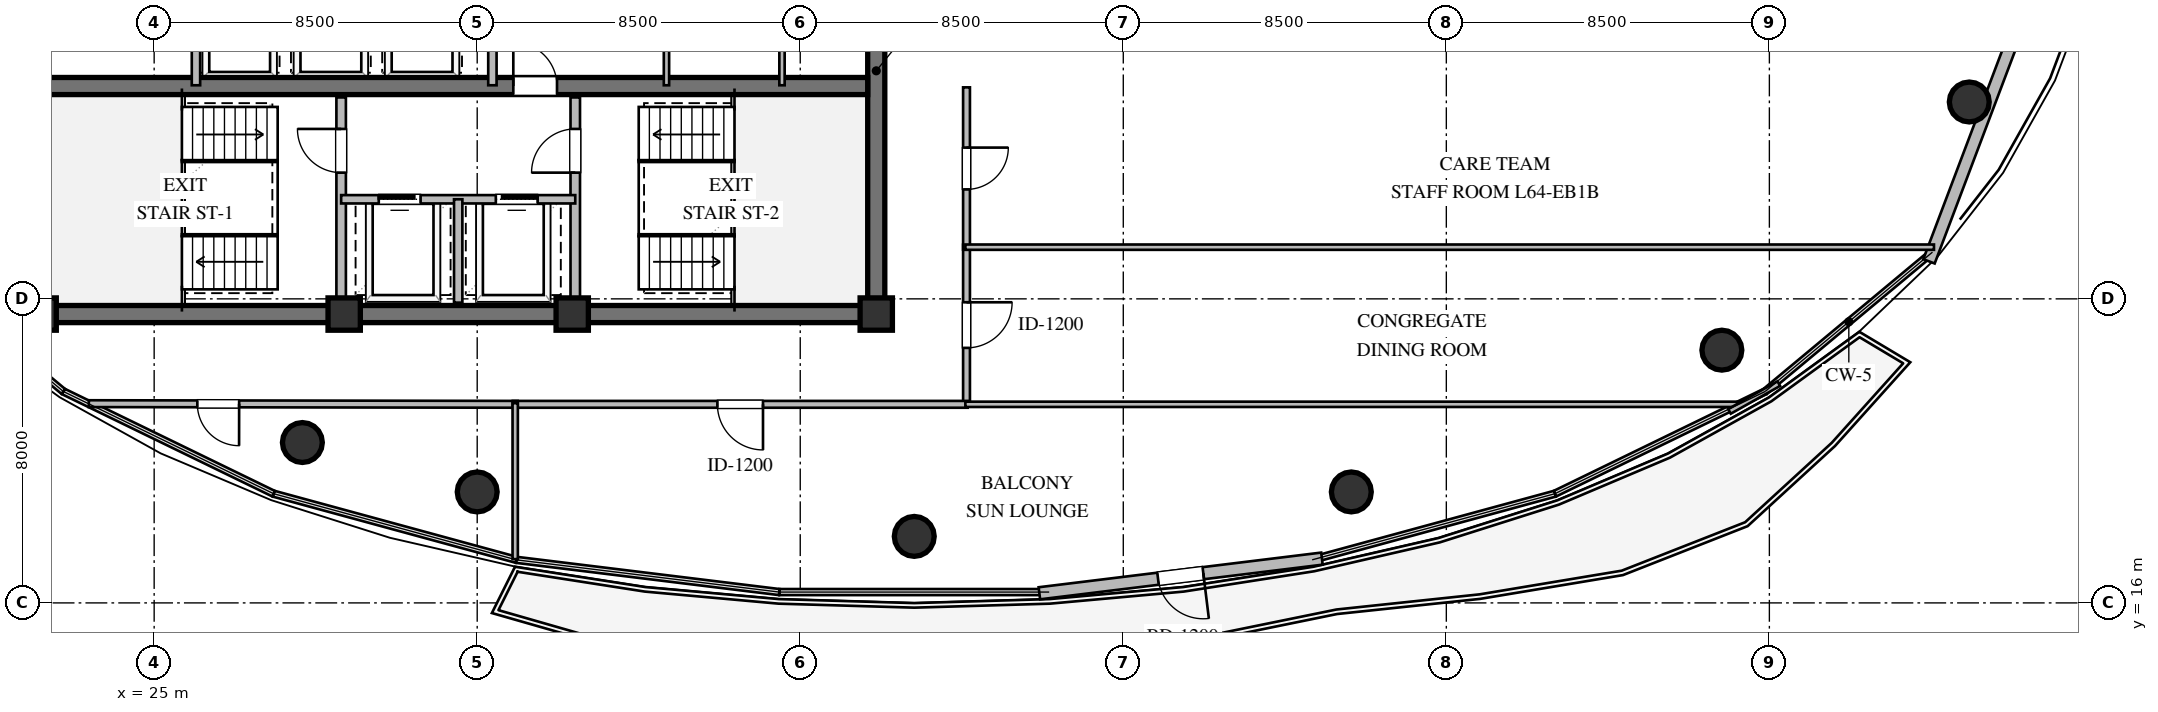
"""IFC4 building model, lengths in metres.
Left out: names, types, materials, properties, quantities, classifications, styles, units other than length and angle.
Written with IfcOpenShell. Run it as: python <this file> out.ifc"""

import sys

from ifc_helpers import new_model, si_unit, direction, frame, frame_2d, origin, origin_2d, place, context, subcontext, project, spatial, rectangle, circle, extrude, element, fill, save


model = new_model("IFC4")
c1 = context("Model", 3, precision=1e-05, world=origin(), true_north=direction((0.0, 1.0)))
c2 = subcontext(c1, "Body", "Model", "MODEL_VIEW")
j1 = project(units=[si_unit("LENGTHUNIT", "METRE"), si_unit("PLANEANGLEUNIT", "RADIAN")], contexts=[c1])
p1 = place(None, origin())
s1 = spatial("IfcSite", under=j1, at=p1, CompositionType="ELEMENT")
p2 = place(p1, origin())
s2 = spatial("IfcBuilding", under=s1, at=p2, CompositionType="ELEMENT")
p3 = place(p2, frame((0.0, 0.0, 242.4)))
s3 = spatial("IfcBuildingStorey", under=s2, at=p3, CompositionType="ELEMENT", Elevation=242.4)
p4 = place(p3, frame((21.775, 23.6, 0.0), z_axis=(0.0, 0.0, 1.0), x_axis=(1.0, 0.0, 0.0)))
e1 = element("IfcWall", 1, at=p4, inside=s3, PredefinedType="SHEAR", context=c2, shape_type="SweptSolid", body=[
    extrude(rectangle(XDim=22.45, YDim=0.45, at=frame_2d((11.225, 0.0))), origin(), (0.0, 0.0, 1.0), 3.36),
])
p5 = place(p3, frame((44.0, 23.825, 0.0), z_axis=(0.0, 0.0, 1.0), x_axis=(0.0, 1.0, 0.0)))
e2 = element("IfcWall", 2, at=p5, inside=s3, PredefinedType="SHEAR", context=c2, shape_type="SweptSolid", body=[
    extrude(rectangle(XDim=12.35, YDim=0.45, at=frame_2d((6.175, 0.0))), origin(), (0.0, 0.0, 1.0), 3.36),
])
p6 = place(p5, frame((8.675, 0.0, 0.0)))
e3 = element("IfcOpeningElement", 3, at=p6, cuts=e2, PredefinedType="OPENING", context=c2, shape_type="SweptSolid", body=[
    extrude(rectangle(XDim=1.5, YDim=2.15, at=frame_2d((0.75, 1.075))), frame((0.0, 0.235, 0.0), z_axis=(0.0, -1.0, 0.0), x_axis=(1.0, 0.0, 0.0)), (0.0, 0.0, 1.0), 0.47),
])
p7 = place(p3, frame((22.225, 29.6, 0.0), z_axis=(0.0, 0.0, 1.0), x_axis=(1.0, 0.0, 0.0)))
e4 = element("IfcWall", 4, at=p7, inside=s3, PredefinedType="SHEAR", context=c2, shape_type="SweptSolid", body=[
    extrude(rectangle(XDim=21.55, YDim=0.45, at=frame_2d((10.775, 0.0))), origin(), (0.0, 0.0, 1.0), 3.36),
])
p8 = place(p7, frame((12.225, 0.0, 0.0)))
e5 = element("IfcOpeningElement", 5, at=p8, cuts=e4, PredefinedType="OPENING", context=c2, shape_type="SweptSolid", body=[
    extrude(rectangle(XDim=1.15, YDim=2.1, at=frame_2d((0.575, 1.05))), frame((0.0, 0.235, 0.0), z_axis=(0.0, -1.0, 0.0), x_axis=(1.0, 0.0, 0.0)), (0.0, 0.0, 1.0), 0.47),
])
for number, where, z_axis, x_axis in (
    (6, (22.0, 23.6, 0.0), (0.0, 0.0, 1.0), (1.0, 0.0, 0.0)),
    (7, (30.0, 23.6, 0.0), (0.0, 0.0, 1.0), (1.0, 0.0, 0.0)),
    (8, (36.0, 23.6, 0.0), (0.0, 0.0, 1.0), (1.0, 0.0, 0.0)),
    (9, (44.0, 23.6, 0.0), (0.0, 0.0, 1.0), (1.0, 0.0, 0.0)),
):
    element("IfcColumn", number, at=place(p3, frame(where, z_axis=z_axis, x_axis=x_axis)), inside=s3, PredefinedType="COLUMN", context=c2, shape_type="SweptSolid", body=[
        extrude(rectangle(XDim=0.85, YDim=0.85, at=origin_2d()), origin(), (0.0, 0.0, 1.0), 3.6),
    ])
for number, where, z_axis, x_axis in (
    (10, (28.9, 20.22, 0.0), (0.0, 0.0, 1.0), (1.0, 0.0, 0.0)),
    (11, (33.5, 18.92, 0.0), (0.0, 0.0, 1.0), (1.0, 0.0, 0.0)),
    (12, (45.0, 17.75, 0.0), (0.0, 0.0, 1.0), (1.0, 0.0, 0.0)),
    (13, (56.5, 18.92, 0.0), (0.0, 0.0, 1.0), (1.0, 0.0, 0.0)),
    (14, (66.25, 22.65, 0.0), (0.0, 0.0, 1.0), (1.0, 0.0, 0.0)),
    (15, (72.76, 29.18, 0.0), (0.0, 0.0, 1.0), (1.0, 0.0, 0.0)),
):
    element("IfcColumn", number, at=place(p3, frame(where, z_axis=z_axis, x_axis=x_axis)), inside=s3, PredefinedType="COLUMN", context=c2, shape_type="SweptSolid", body=[
        extrude(circle(Radius=0.525, at=origin_2d()), origin(), (0.0, 0.0, 1.0), 3.6),
    ])
p9 = place(p3, frame((76.712, 38.243, 0.0), z_axis=(0.0, 0.0, 1.0), x_axis=(-0.353659523244, -0.935374225441, 0.0)))
e16 = element("IfcWall", 16, at=p9, inside=s3, PredefinedType="STANDARD", context=c2, shape_type="SweptSolid", body=[
    extrude(rectangle(XDim=14.172, YDim=0.32, at=frame_2d((7.086, 0.0))), origin(), (0.0, 0.0, 1.0), 3.36),
])
p10 = place(p3, frame((55.727, 17.165, 0.0), z_axis=(0.0, 0.0, 1.0), x_axis=(-0.992559081031, -0.121763995755, 0.0)))
e17 = element("IfcWall", 17, at=p10, inside=s3, PredefinedType="STANDARD", context=c2, shape_type="SweptSolid", body=[
    extrude(rectangle(XDim=7.491, YDim=0.32, at=frame_2d((3.745, 0.0))), origin(), (0.0, 0.0, 1.0), 3.36),
])
p11 = place(p10, frame((3.145, 0.0, 0.0)))
e18 = element("IfcOpeningElement", 18, at=p11, cuts=e17, PredefinedType="OPENING", context=c2, shape_type="SweptSolid", body=[
    extrude(rectangle(XDim=1.2, YDim=2.15, at=frame_2d((0.6, 1.075))), frame((0.0, 0.17, 0.0), z_axis=(0.0, -1.0, 0.0), x_axis=(1.0, 0.0, 0.0)), (0.0, 0.0, 1.0), 0.34),
])
p12 = place(p3, frame((29.92, 23.9, 0.0), z_axis=(0.0, 0.0, 1.0), x_axis=(0.0, 1.0, 0.0)))
e19 = element("IfcWall", 19, at=p12, inside=s3, PredefinedType="SOLIDWALL", context=c2, shape_type="SweptSolid", body=[
    extrude(rectangle(XDim=5.4, YDim=0.25, at=frame_2d((2.7, 0.0))), origin(), (0.0, 0.0, 1.0), 3.36),
])
p13 = place(p12, frame((3.421, 0.0, 0.0)))
e20 = element("IfcOpeningElement", 20, at=p13, cuts=e19, PredefinedType="OPENING", context=c2, shape_type="SweptSolid", body=[
    extrude(rectangle(XDim=1.15, YDim=2.1, at=frame_2d((0.575, 1.05))), frame((0.0, 0.135, 0.0), z_axis=(0.0, -1.0, 0.0), x_axis=(1.0, 0.0, 0.0)), (0.0, 0.0, 1.0), 0.27),
])
p14 = place(p3, frame((36.08, 23.9, 0.0), z_axis=(0.0, 0.0, 1.0), x_axis=(0.0, 1.0, 0.0)))
e21 = element("IfcWall", 21, at=p14, inside=s3, PredefinedType="SOLIDWALL", context=c2, shape_type="SweptSolid", body=[
    extrude(rectangle(XDim=5.4, YDim=0.25, at=frame_2d((2.7, 0.0))), origin(), (0.0, 0.0, 1.0), 3.36),
])
p15 = place(p14, frame((3.421, 0.0, 0.0)))
e22 = element("IfcOpeningElement", 22, at=p15, cuts=e21, PredefinedType="OPENING", context=c2, shape_type="SweptSolid", body=[
    extrude(rectangle(XDim=1.15, YDim=2.1, at=frame_2d((0.575, 1.05))), frame((0.0, 0.135, 0.0), z_axis=(0.0, -1.0, 0.0), x_axis=(1.0, 0.0, 0.0)), (0.0, 0.0, 1.0), 0.27),
])
p16 = place(p3, frame((29.92, 26.62, 0.0), z_axis=(0.0, 0.0, 1.0), x_axis=(1.0, 0.0, 0.0)))
e23 = element("IfcWall", 23, at=p16, inside=s3, PredefinedType="SOLIDWALL", context=c2, shape_type="SweptSolid", body=[
    extrude(rectangle(XDim=6.16, YDim=0.22, at=frame_2d((3.08, 0.0))), origin(), (0.0, 0.0, 1.0), 3.36),
])
p17 = place(p16, frame((0.99, 0.0, 0.0)))
e24 = element("IfcOpeningElement", 24, at=p17, cuts=e23, PredefinedType="OPENING", context=c2, shape_type="SweptSolid", body=[
    extrude(rectangle(XDim=1.1, YDim=2.1, at=frame_2d((0.55, 1.05))), frame((0.0, 0.12, 0.0), z_axis=(0.0, -1.0, 0.0), x_axis=(1.0, 0.0, 0.0)), (0.0, 0.0, 1.0), 0.24),
])
p18 = place(p16, frame((4.07, 0.0, 0.0)))
e25 = element("IfcOpeningElement", 25, at=p18, cuts=e23, PredefinedType="OPENING", context=c2, shape_type="SweptSolid", body=[
    extrude(rectangle(XDim=1.1, YDim=2.1, at=frame_2d((0.55, 1.05))), frame((0.0, 0.12, 0.0), z_axis=(0.0, -1.0, 0.0), x_axis=(1.0, 0.0, 0.0)), (0.0, 0.0, 1.0), 0.24),
])
p19 = place(p3, frame((33.0, 23.9, 0.0), z_axis=(0.0, 0.0, 1.0), x_axis=(0.0, 1.0, 0.0)))
e26 = element("IfcWall", 26, at=p19, inside=s3, PredefinedType="SOLIDWALL", context=c2, shape_type="SweptSolid", body=[
    extrude(rectangle(XDim=2.72, YDim=0.22, at=frame_2d((1.36, 0.0))), origin(), (0.0, 0.0, 1.0), 3.36),
])
for number, where, z_axis, x_axis in (
    (27, (26.1, 29.62, 0.0), (0.0, 0.0, 1.0), (0.0, 1.0, 0.0)),
    (28, (33.9, 29.62, 0.0), (0.0, 0.0, 1.0), (0.0, 1.0, 0.0)),
):
    element("IfcWall", number, at=place(p3, frame(where, z_axis=z_axis, x_axis=x_axis)), inside=s3, PredefinedType="SOLIDWALL", context=c2, shape_type="SweptSolid", body=[
        extrude(rectangle(XDim=2.36, YDim=0.22, at=frame_2d((1.18, 0.0))), origin(), (0.0, 0.0, 1.0), 3.36),
    ])
for number, where, z_axis, x_axis in (
    (29, (38.48, 29.62, 0.0), (0.0, 0.0, 1.0), (0.0, 1.0, 0.0)),
    (30, (41.52, 29.62, 0.0), (0.0, 0.0, 1.0), (0.0, 1.0, 0.0)),
):
    element("IfcWall", number, at=place(p3, frame(where, z_axis=z_axis, x_axis=x_axis)), inside=s3, PredefinedType="PARTITIONING", context=c2, shape_type="SweptSolid", body=[
        extrude(rectangle(XDim=2.36, YDim=0.14, at=frame_2d((1.18, 0.0))), origin(), (0.0, 0.0, 1.0), 3.36),
    ])
p20 = place(p3, frame((46.375, 25.425, 0.0), z_axis=(0.0, 0.0, 1.0), x_axis=(0.0, -1.0, 0.0)))
e31 = element("IfcWall", 31, at=p20, inside=s3, PredefinedType="PARTITIONING", context=c2, shape_type="SweptSolid", body=[
    extrude(rectangle(XDim=4.23, YDim=0.18, at=frame_2d((2.115, 0.0))), origin(), (0.0, 0.0, 1.0), 3.36),
])
p21 = place(p20, frame((1.515, 0.0, 0.0)))
e32 = element("IfcOpeningElement", 32, at=p21, cuts=e31, PredefinedType="OPENING", context=c2, shape_type="SweptSolid", body=[
    extrude(rectangle(XDim=1.2, YDim=2.15, at=frame_2d((0.6, 1.075))), frame((0.0, 0.1, 0.0), z_axis=(0.0, -1.0, 0.0), x_axis=(1.0, 0.0, 0.0)), (0.0, 0.0, 1.0), 0.2),
])
p22 = place(p3, frame((46.375, 29.565, 0.0), z_axis=(0.0, 0.0, 1.0), x_axis=(0.0, -1.0, 0.0)))
e33 = element("IfcWall", 33, at=p22, inside=s3, PredefinedType="PARTITIONING", context=c2, shape_type="SweptSolid", body=[
    extrude(rectangle(XDim=4.27, YDim=0.18, at=frame_2d((2.135, 0.0))), origin(), (0.0, 0.0, 1.0), 3.36),
])
p23 = place(p22, frame((1.585, 0.0, 0.0)))
e34 = element("IfcOpeningElement", 34, at=p23, cuts=e33, PredefinedType="OPENING", context=c2, shape_type="SweptSolid", body=[
    extrude(rectangle(XDim=1.1, YDim=2.1, at=frame_2d((0.55, 1.05))), frame((0.0, 0.1, 0.0), z_axis=(0.0, -1.0, 0.0), x_axis=(1.0, 0.0, 0.0)), (0.0, 0.0, 1.0), 0.2),
])
p24 = place(p3, frame((34.565, 21.225, 0.0), z_axis=(0.0, 0.0, 1.0), x_axis=(-0.999998853153, 0.001514494152, 0.0)))
e35 = element("IfcWall", 35, at=p24, inside=s3, PredefinedType="PARTITIONING", context=c2, shape_type="SweptSolid", body=[
    extrude(rectangle(XDim=11.284, YDim=0.18, at=frame_2d((5.642, 0.0))), origin(), (0.0, 0.0, 1.0), 2.806),
])
p25 = place(p24, frame((7.329, 0.0, 0.0)))
e36 = element("IfcOpeningElement", 36, at=p25, cuts=e35, PredefinedType="OPENING", context=c2, shape_type="SweptSolid", body=[
    extrude(rectangle(XDim=1.1, YDim=2.1, at=frame_2d((0.55, 1.05))), frame((0.0, 0.1, 0.0), z_axis=(0.0, -1.0, 0.0), x_axis=(1.0, 0.0, 0.0)), (0.0, 0.0, 1.0), 0.2),
])
p26 = place(p3, frame((46.405, 21.225, 0.0), z_axis=(0.0, 0.0, 1.0), x_axis=(-1.0, 0.0, 0.0)))
e37 = element("IfcWall", 37, at=p26, inside=s3, PredefinedType="PARTITIONING", context=c2, shape_type="SweptSolid", body=[
    extrude(rectangle(XDim=11.97, YDim=0.18, at=frame_2d((5.985, 0.0))), origin(), (0.0, 0.0, 1.0), 2.996),
])
p27 = place(p26, frame((5.385, 0.0, 0.0)))
e38 = element("IfcOpeningElement", 38, at=p27, cuts=e37, PredefinedType="OPENING", context=c2, shape_type="SweptSolid", body=[
    extrude(rectangle(XDim=1.2, YDim=2.15, at=frame_2d((0.6, 1.075))), frame((0.0, 0.1, 0.0), z_axis=(0.0, -1.0, 0.0), x_axis=(1.0, 0.0, 0.0)), (0.0, 0.0, 1.0), 0.2),
])
p28 = place(p3, frame((46.345, 25.36, 0.0), z_axis=(0.0, 0.0, 1.0), x_axis=(1.0, 0.0, 0.0)))
e39 = element("IfcWall", 39, at=p28, inside=s3, PredefinedType="PARTITIONING", context=c2, shape_type="SweptSolid", body=[
    extrude(rectangle(XDim=25.486, YDim=0.14, at=frame_2d((12.743, 0.0))), origin(), (0.0, 0.0, 1.0), 2.806),
])
p29 = place(p3, frame((66.684, 21.225, 0.0), z_axis=(0.0, 0.0, 1.0), x_axis=(-1.0, 0.0, 0.0)))
e40 = element("IfcWall", 40, at=p29, inside=s3, PredefinedType="PARTITIONING", context=c2, shape_type="SweptSolid", body=[
    extrude(rectangle(XDim=20.339, YDim=0.14, at=frame_2d((10.169, 0.0))), origin(), (0.0, 0.0, 1.0), 2.996),
])
p30 = place(p3, frame((67.748, 21.77, 0.0), z_axis=(0.0, 0.0, 1.0), x_axis=(-0.871352238731, -0.490658003153, 0.0)))
e41 = element("IfcWall", 41, at=p30, inside=s3, PredefinedType="PARTITIONING", context=c2, shape_type="SweptSolid", body=[
    extrude(rectangle(XDim=1.49, YDim=0.14, at=frame_2d((0.745, 0.0))), origin(), (0.0, 0.0, 1.0), 3.36),
])
p31 = place(p3, frame((34.5, 21.255, 0.0), z_axis=(0.0, 0.0, 1.0), x_axis=(0.0, -1.0, 0.0)))
e42 = element("IfcWall", 42, at=p31, inside=s3, PredefinedType="PARTITIONING", context=c2, shape_type="SweptSolid", body=[
    extrude(rectangle(XDim=4.104, YDim=0.14, at=frame_2d((2.052, 0.0))), origin(), (0.0, 0.0, 1.0), 3.36),
])
p32 = place(p11, origin())
e43 = element("IfcDoor", 43, at=p32, inside=s3, OperationType="SINGLE_SWING_LEFT", PredefinedType="DOOR", context=c2, shape_type="SweptSolid", body=[
    extrude(rectangle(XDim=1.2, YDim=2.15, at=frame_2d((0.6, 1.075))), frame((0.0, 0.025, 0.0), z_axis=(0.0, -1.0, 0.0), x_axis=(1.0, 0.0, 0.0)), (0.0, 0.0, 1.0), 0.05),
])
fill(e18, e43)
p33 = place(p13, origin())
e44 = element("IfcDoor", 44, at=p33, inside=s3, OperationType="SINGLE_SWING_RIGHT", PredefinedType="DOOR", context=c2, shape_type="SweptSolid", body=[
    extrude(rectangle(XDim=1.15, YDim=2.1, at=frame_2d((0.575, 1.05))), frame((0.0, 0.025, 0.0), z_axis=(0.0, -1.0, 0.0), x_axis=(1.0, 0.0, 0.0)), (0.0, 0.0, 1.0), 0.05),
])
fill(e20, e44)
p34 = place(p15, origin())
e45 = element("IfcDoor", 45, at=p34, inside=s3, OperationType="SINGLE_SWING_LEFT", PredefinedType="DOOR", context=c2, shape_type="SweptSolid", body=[
    extrude(rectangle(XDim=1.15, YDim=2.1, at=frame_2d((0.575, 1.05))), frame((0.0, 0.025, 0.0), z_axis=(0.0, -1.0, 0.0), x_axis=(1.0, 0.0, 0.0)), (0.0, 0.0, 1.0), 0.05),
])
fill(e22, e45)
p35 = place(p17, origin())
e46 = element("IfcDoor", 46, at=p35, inside=s3, OperationType="SLIDING_TO_LEFT", PredefinedType="DOOR", context=c2, shape_type="SweptSolid", body=[
    extrude(rectangle(XDim=1.1, YDim=2.1, at=frame_2d((0.55, 1.05))), frame((0.0, 0.025, 0.0), z_axis=(0.0, -1.0, 0.0), x_axis=(1.0, 0.0, 0.0)), (0.0, 0.0, 1.0), 0.05),
])
fill(e24, e46)
p36 = place(p18, origin())
e47 = element("IfcDoor", 47, at=p36, inside=s3, OperationType="SLIDING_TO_RIGHT", PredefinedType="DOOR", context=c2, shape_type="SweptSolid", body=[
    extrude(rectangle(XDim=1.1, YDim=2.1, at=frame_2d((0.55, 1.05))), frame((0.0, 0.025, 0.0), z_axis=(0.0, -1.0, 0.0), x_axis=(1.0, 0.0, 0.0)), (0.0, 0.0, 1.0), 0.05),
])
fill(e25, e47)
p37 = place(p8, origin())
e48 = element("IfcDoor", 48, at=p37, inside=s3, OperationType="SINGLE_SWING_LEFT", PredefinedType="DOOR", context=c2, shape_type="SweptSolid", body=[
    extrude(rectangle(XDim=1.15, YDim=2.1, at=frame_2d((0.575, 1.05))), frame((0.0, 0.025, 0.0), z_axis=(0.0, -1.0, 0.0), x_axis=(1.0, 0.0, 0.0)), (0.0, 0.0, 1.0), 0.05),
])
fill(e5, e48)
p38 = place(p21, origin())
e49 = element("IfcDoor", 49, at=p38, inside=s3, OperationType="SINGLE_SWING_LEFT", PredefinedType="DOOR", context=c2, shape_type="SweptSolid", body=[
    extrude(rectangle(XDim=1.2, YDim=2.15, at=frame_2d((0.6, 1.075))), frame((0.0, 0.025, 0.0), z_axis=(0.0, -1.0, 0.0), x_axis=(1.0, 0.0, 0.0)), (0.0, 0.0, 1.0), 0.05),
])
fill(e32, e49)
p39 = place(p23, origin())
e50 = element("IfcDoor", 50, at=p39, inside=s3, OperationType="SINGLE_SWING_LEFT", PredefinedType="DOOR", context=c2, shape_type="SweptSolid", body=[
    extrude(rectangle(XDim=1.1, YDim=2.1, at=frame_2d((0.55, 1.05))), frame((0.0, 0.025, 0.0), z_axis=(0.0, -1.0, 0.0), x_axis=(1.0, 0.0, 0.0)), (0.0, 0.0, 1.0), 0.05),
])
fill(e34, e50)
p40 = place(p25, origin())
e51 = element("IfcDoor", 51, at=p40, inside=s3, OperationType="SINGLE_SWING_LEFT", PredefinedType="DOOR", context=c2, shape_type="SweptSolid", body=[
    extrude(rectangle(XDim=1.1, YDim=2.1, at=frame_2d((0.55, 1.05))), frame((0.0, 0.025, 0.0), z_axis=(0.0, -1.0, 0.0), x_axis=(1.0, 0.0, 0.0)), (0.0, 0.0, 1.0), 0.05),
])
fill(e36, e51)
p41 = place(p27, origin())
e52 = element("IfcDoor", 52, at=p41, inside=s3, OperationType="SINGLE_SWING_LEFT", PredefinedType="DOOR", context=c2, shape_type="SweptSolid", body=[
    extrude(rectangle(XDim=1.2, YDim=2.15, at=frame_2d((0.6, 1.075))), frame((0.0, 0.025, 0.0), z_axis=(0.0, -1.0, 0.0), x_axis=(1.0, 0.0, 0.0)), (0.0, 0.0, 1.0), 0.05),
])
fill(e38, e52)
save(model, sys.argv[1])
